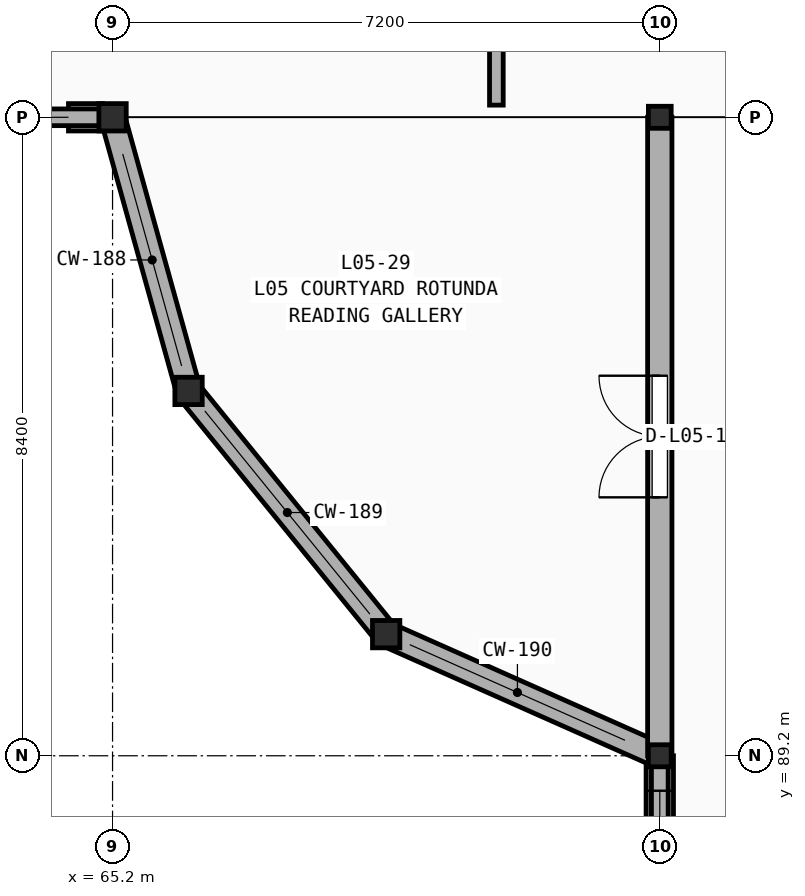
"""IFC4 building model, lengths in metres.
Left out: names, types, materials, properties, quantities, classifications, styles, units other than length and angle.
Written with IfcOpenShell. Run it as: python <this file> out.ifc"""

import sys

from ifc_helpers import new_model, si_unit, direction, frame, frame_2d, origin, origin_2d, place, context, subcontext, project, spatial, rectangle, i_section, extrude, element, fill, save


model = new_model("IFC4")
c1 = context("Model", 3, precision=1e-05, world=origin(), true_north=direction((0.0, 1.0)))
c2 = subcontext(c1, "Body", "Model", "MODEL_VIEW")
j1 = project(units=[si_unit("LENGTHUNIT", "METRE"), si_unit("PLANEANGLEUNIT", "RADIAN")], contexts=[c1])
p1 = place(None, origin())
s1 = spatial("IfcSite", under=j1, at=p1, CompositionType="ELEMENT")
p2 = place(p1, origin())
s2 = spatial("IfcBuilding", under=s1, at=p2, CompositionType="ELEMENT")
p3 = place(p2, frame((0.0, 0.0, 21.6)))
s3 = spatial("IfcBuildingStorey", under=s2, at=p3, CompositionType="ELEMENT", Elevation=21.6)
for number, where, z_axis, x_axis in (
    (1, (65.2, 97.6, 0.0), (0.0, 0.0, 1.0), (1.0, 0.0, 0.0)),
    (2, (66.2, 94.0, 0.0), (0.0, 0.0, 1.0), (1.0, 0.0, 0.0)),
    (3, (68.8, 90.8, 0.0), (0.0, 0.0, 1.0), (1.0, 0.0, 0.0)),
):
    element("IfcColumn", number, at=place(p3, frame(where, z_axis=z_axis, x_axis=x_axis)), inside=s3, PredefinedType="COLUMN", context=c2, shape_type="SweptSolid", body=[
        extrude(rectangle(XDim=0.36, YDim=0.36, at=origin_2d()), origin(), (0.0, 0.0, 1.0), 3.6),
    ])
for number, where, z_axis, x_axis in (
    (4, (72.4, 89.2, 0.0), (0.0, 0.0, 1.0), (1.0, 0.0, 0.0)),
    (5, (72.4, 97.6, 0.0), (0.0, 0.0, 1.0), (1.0, 0.0, 0.0)),
):
    element("IfcColumn", number, at=place(p3, frame(where, z_axis=z_axis, x_axis=x_axis)), inside=s3, PredefinedType="COLUMN", context=c2, shape_type="SweptSolid", body=[
        extrude(i_section(OverallWidth=0.3, OverallDepth=0.29, WebThickness=0.009, FlangeThickness=0.014, at=origin_2d()), origin(), (0.0, 0.0, 1.0), 3.6),
    ])
p4 = place(p3, frame((70.25, 97.76, 0.0), z_axis=(0.0, 0.0, 1.0), x_axis=(0.0, 1.0, 0.0)))
e6 = element("IfcWall", 6, at=p4, inside=s3, PredefinedType="PARTITIONING", context=c2, shape_type="SweptSolid", body=[
    extrude(rectangle(XDim=4.19, YDim=0.18, at=frame_2d((2.095, 0.0))), origin(), (0.0, 0.0, 1.0), 2.71),
])
p5 = place(p3, frame((72.4, 89.2, 0.0), z_axis=(0.0, 0.0, 1.0), x_axis=(0.0, 1.0, 0.0)))
e7 = element("IfcWall", 7, at=p5, inside=s3, PredefinedType="PARTITIONING", context=c2, shape_type="SweptSolid", body=[
    extrude(rectangle(XDim=8.4, YDim=0.18, at=frame_2d((4.2, 0.0))), origin(), (0.0, 0.0, 1.0), 2.71),
])
p6 = place(p5, frame((3.4, 0.0, -0.01)))
e8 = element("IfcOpeningElement", 8, at=p6, cuts=e7, PredefinedType="OPENING", context=c2, shape_type="SweptSolid", body=[
    extrude(rectangle(XDim=1.6, YDim=2.21, at=frame_2d((0.8, 1.105))), frame((0.0, 0.1, 0.0), z_axis=(0.0, -1.0, 0.0), x_axis=(1.0, 0.0, 0.0)), (0.0, 0.0, 1.0), 0.2),
])
p7 = place(p3, frame((64.62, 97.6, 0.0), z_axis=(0.0, 0.0, 1.0), x_axis=(1.0, 0.0, 0.0)))
e9 = element("IfcWall", 9, at=p7, inside=s3, PredefinedType="SOLIDWALL", context=c2, shape_type="SweptSolid", body=[
    extrude(rectangle(XDim=0.45, YDim=0.36, at=frame_2d((0.225, 0.0))), origin(), (0.0, 0.0, 1.0), 2.71),
])
p8 = place(p3, frame((72.4, 89.2, 0.0), z_axis=(0.0, 0.0, 1.0), x_axis=(0.0, -1.0, 0.0)))
e10 = element("IfcWall", 10, at=p8, inside=s3, PredefinedType="SOLIDWALL", context=c2, shape_type="SweptSolid", body=[
    extrude(rectangle(XDim=8.4, YDim=0.36, at=frame_2d((4.2, 0.0))), origin(), (0.0, 0.0, 1.0), 2.71),
])
p9 = place(p8, frame((0.46, 0.0, 0.75)))
e11 = element("IfcOpeningElement", 11, at=p9, cuts=e10, PredefinedType="OPENING", context=c2, shape_type="SweptSolid", body=[
    extrude(rectangle(XDim=1.55, YDim=1.82, at=frame_2d((0.775, 0.91))), frame((0.0, 0.19, 0.0), z_axis=(0.0, -1.0, 0.0), x_axis=(1.0, 0.0, 0.0)), (0.0, 0.0, 1.0), 0.38),
])
p10 = place(p8, frame((6.26, 0.0, 0.75)))
e12 = element("IfcOpeningElement", 12, at=p10, cuts=e10, PredefinedType="OPENING", context=c2, shape_type="SweptSolid", body=[
    extrude(rectangle(XDim=1.55, YDim=1.82, at=frame_2d((0.775, 0.91))), frame((0.0, 0.19, 0.0), z_axis=(0.0, -1.0, 0.0), x_axis=(1.0, 0.0, 0.0)), (0.0, 0.0, 1.0), 0.38),
])
p11 = place(p3, frame((65.275, 97.33, 0.0), z_axis=(0.0, 0.0, 1.0), x_axis=(0.267529355044, -0.963549710285, 0.0)))
e13 = element("IfcWall", 13, at=p11, inside=s3, PredefinedType="SOLIDWALL", context=c2, shape_type="SweptSolid", body=[
    extrude(rectangle(XDim=0.22, YDim=0.24, at=frame_2d((0.11, 0.0))), origin(), (0.0, 0.0, 1.0), 2.71),
])
for number, where, z_axis, x_axis in (
    (14, (66.109, 94.328, 0.0), (0.0, 0.0, 1.0), (0.268, -0.963, 0.0)),
    (15, (66.2, 94.0, 0.0), (0.0, 0.0, 1.0), (0.63, -0.776, 0.0)),
    (16, (68.586, 91.064, 0.0), (0.0, 0.0, 1.0), (0.63, -0.776, 0.0)),
):
    element("IfcWall", number, at=place(p3, frame(where, z_axis=z_axis, x_axis=x_axis)), inside=s3, PredefinedType="SOLIDWALL", context=c2, shape_type="SweptSolid", body=[
        extrude(rectangle(XDim=0.34, YDim=0.24, at=frame_2d((0.17, 0.0))), origin(), (0.0, 0.0, 1.0), 2.71),
    ])
p12 = place(p3, frame((68.8, 90.8, 0.0), z_axis=(0.0, 0.0, 1.0), x_axis=(0.913633745955, -0.406538286329, 0.0)))
e17 = element("IfcWall", 17, at=p12, inside=s3, PredefinedType="SOLIDWALL", context=c2, shape_type="SweptSolid", body=[
    extrude(rectangle(XDim=0.34, YDim=0.24, at=frame_2d((0.17, 0.0))), origin(), (0.0, 0.0, 1.0), 2.71),
])
p13 = place(p3, frame((71.943, 89.403, 0.0), z_axis=(0.0, 0.0, 1.0), x_axis=(0.913719959968, -0.406344477944, 0.0)))
e18 = element("IfcWall", 18, at=p13, inside=s3, PredefinedType="SOLIDWALL", context=c2, shape_type="SweptSolid", body=[
    extrude(rectangle(XDim=0.22, YDim=0.24, at=frame_2d((0.11, 0.0))), origin(), (0.0, 0.0, 1.0), 2.71),
])
p14 = place(p3, frame((65.2, 97.6, 3.6), z_axis=(0.0, 0.0, 1.0), x_axis=(0.267637123724, -0.963519781844, 0.0)))
e19 = element("IfcWall", 19, at=p14, inside=s3, PredefinedType="PARAPET", context=c2, shape_type="SweptSolid", body=[
    extrude(rectangle(XDim=3.736, YDim=0.32, at=frame_2d((1.868, 0.0))), origin(), (0.0, 0.0, 1.0), 0.75),
])
p15 = place(p3, frame((66.2, 94.0, 3.6), z_axis=(0.0, 0.0, 1.0), x_axis=(0.630612687458, -0.776097699015, 0.0)))
e20 = element("IfcWall", 20, at=p15, inside=s3, PredefinedType="PARAPET", context=c2, shape_type="SweptSolid", body=[
    extrude(rectangle(XDim=4.123, YDim=0.32, at=frame_2d((2.062, 0.0))), origin(), (0.0, 0.0, 1.0), 1.2),
])
p16 = place(p3, frame((68.8, 90.8, 3.6), z_axis=(0.0, 0.0, 1.0), x_axis=(0.913796214371, -0.40617296636, 0.0)))
e21 = element("IfcWall", 21, at=p16, inside=s3, PredefinedType="PARAPET", context=c2, shape_type="SweptSolid", body=[
    extrude(rectangle(XDim=3.939, YDim=0.32, at=frame_2d((1.97, 0.0))), origin(), (0.0, 0.0, 1.0), 1.2),
])
p17 = place(p3, frame((72.4, 89.2, 3.6), z_axis=(0.0, 0.0, 1.0), x_axis=(0.0, 1.0, 0.0)))
e22 = element("IfcWall", 22, at=p17, inside=s3, PredefinedType="PARAPET", context=c2, shape_type="SweptSolid", body=[
    extrude(rectangle(XDim=8.4, YDim=0.32, at=frame_2d((4.2, 0.0))), origin(), (0.0, 0.0, 1.0), 1.2),
])
p18 = place(p3, frame((46.0, 97.6, 3.6), z_axis=(0.0, 0.0, 1.0), x_axis=(1.0, 0.0, 0.0)))
e23 = element("IfcWall", 23, at=p18, inside=s3, PredefinedType="PARAPET", context=c2, shape_type="SweptSolid", body=[
    extrude(rectangle(XDim=19.2, YDim=0.22, at=frame_2d((9.6, 0.0))), origin(), (0.0, 0.0, 1.0), 1.15),
])
p19 = place(p3, frame((72.4, 50.8, 3.6), z_axis=(0.0, 0.0, 1.0), x_axis=(0.0, 1.0, 0.0)))
e24 = element("IfcWall", 24, at=p19, inside=s3, PredefinedType="PARAPET", context=c2, shape_type="SweptSolid", body=[
    extrude(rectangle(XDim=38.4, YDim=0.22, at=frame_2d((19.2, 0.0))), origin(), (0.0, 0.0, 1.0), 1.15),
])
p20 = place(p6, frame((0.0, 0.0, 0.01)))
e25 = element("IfcDoor", 25, at=p20, inside=s3, OperationType="DOUBLE_SWING_LEFT", PredefinedType="DOOR", context=c2, shape_type="SweptSolid", body=[
    extrude(rectangle(XDim=1.6, YDim=2.2, at=frame_2d((0.8, 1.1))), frame((0.0, 0.025, 0.0), z_axis=(0.0, -1.0, 0.0), x_axis=(1.0, 0.0, 0.0)), (0.0, 0.0, 1.0), 0.05),
])
fill(e8, e25)
p21 = place(p9, origin())
e26 = element("IfcWindow", 26, at=p21, inside=s3, PartitioningType="DOUBLE_PANEL_HORIZONTAL", PredefinedType="WINDOW", context=c2, shape_type="SweptSolid", body=[
    extrude(rectangle(XDim=1.55, YDim=1.82, at=frame_2d((0.775, 0.91))), frame((0.0, 0.03, 0.0), z_axis=(0.0, -1.0, 0.0), x_axis=(1.0, 0.0, 0.0)), (0.0, 0.0, 1.0), 0.06),
])
fill(e11, e26)
save(model, sys.argv[1])
